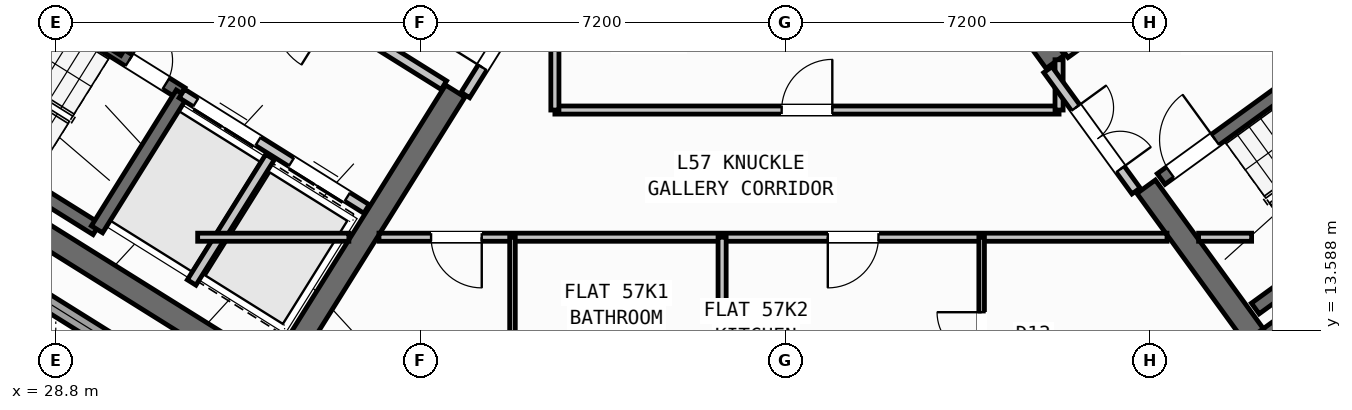
"""IFC4 building model, lengths in metres.
Left out: names, types, materials, properties, quantities, classifications, styles, units other than length and angle.
Written with IfcOpenShell. Run it as: python <this file> out.ifc"""

import sys

from ifc_helpers import new_model, si_unit, direction, frame, frame_2d, origin, place, context, subcontext, project, spatial, rectangle, extrude, source, transform, mapped, element, fill, save


model = new_model("IFC4")
c1 = context("Model", 3, precision=1e-05, world=origin(), true_north=direction((0.0, 1.0)))
c2 = subcontext(c1, "Body", "Model", "MODEL_VIEW")
j1 = project(units=[si_unit("LENGTHUNIT", "METRE"), si_unit("PLANEANGLEUNIT", "RADIAN")], contexts=[c1])
p1 = place(None, origin())
s1 = spatial("IfcSite", under=j1, at=p1, CompositionType="ELEMENT")
p2 = place(p1, origin())
s2 = spatial("IfcBuilding", under=s1, at=p2, CompositionType="ELEMENT")
p3 = place(p2, frame((0.0, 0.0, 225.6)))
s3 = spatial("IfcBuildingStorey", under=s2, at=p3, CompositionType="ELEMENT", Elevation=225.6)
p4 = place(p3, frame((33.324, 12.503, 0.0), z_axis=(0.0, 0.0, 1.0), x_axis=(-0.848043529849, 0.529926571782, 0.0)))
e1 = element("IfcWall", 1, at=p4, inside=s3, PredefinedType="SHEAR", context=c2, shape_type="SweptSolid", body=[
    extrude(rectangle(XDim=13.04, YDim=0.45, at=frame_2d((6.52, 0.0))), origin(), (0.0, 0.0, 1.0), 3.35),
])
p5 = place(p3, frame((36.683, 18.304, 0.0), z_axis=(0.0, 0.0, 1.0), x_axis=(-0.529904039071, -0.848057609704, 0.0)))
e2 = element("IfcWall", 2, at=p5, inside=s3, PredefinedType="SHEAR", context=c2, shape_type="SweptSolid", body=[
    extrude(rectangle(XDim=6.475, YDim=0.45, at=frame_2d((3.238, 0.0))), origin(), (0.0, 0.0, 1.0), 3.35),
])
p6 = place(p3, frame((52.399, 13.169, 0.0), z_axis=(0.0, 0.0, 1.0), x_axis=(0.809022352778, 0.587777877013, 0.0)))
e3 = element("IfcWall", 3, at=p6, inside=s3, PredefinedType="SHEAR", context=c2, shape_type="SweptSolid", body=[
    extrude(rectangle(XDim=12.24, YDim=0.45, at=frame_2d((6.12, 0.0))), origin(), (0.0, 0.0, 1.0), 3.35),
])
p7 = place(p3, frame((52.449, 13.483, 0.0), z_axis=(0.0, 0.0, 1.0), x_axis=(-0.587819244441, 0.808992296542, 0.0)))
e4 = element("IfcWall", 4, at=p7, inside=s3, PredefinedType="SHEAR", context=c2, shape_type="SweptSolid", body=[
    extrude(rectangle(XDim=3.625, YDim=0.45, at=frame_2d((1.812, 0.0))), origin(), (0.0, 0.0, 1.0), 3.35),
])
p8 = place(p3, frame((48.526, 18.884, 0.0), z_axis=(0.0, 0.0, 1.0), x_axis=(-0.587774812919, 0.809024578921, 0.0)))
e5 = element("IfcWall", 5, at=p8, inside=s3, PredefinedType="SHEAR", context=c2, shape_type="SweptSolid", body=[
    extrude(rectangle(XDim=6.475, YDim=0.45, at=frame_2d((3.238, 0.0))), origin(), (0.0, 0.0, 1.0), 3.35),
])
p9 = place(p3, frame((31.76, 12.183, 0.0), z_axis=(0.0, 0.0, 1.0), x_axis=(-0.848047074256, 0.529920899612, 0.0)))
e6 = element("IfcWall", 6, at=p9, inside=s3, PredefinedType="STANDARD", context=c2, shape_type="SweptSolid", body=[
    extrude(rectangle(XDim=30.652, YDim=0.32, at=frame_2d((15.326, 0.0))), origin(), (0.0, 0.0, 1.0), 3.35),
])
p10 = place(p9, frame((15.166, 0.0, 0.0)))
e7 = element("IfcOpeningElement", 7, at=p10, cuts=e6, PredefinedType="OPENING", context=c2, shape_type="SweptSolid", body=[
    extrude(rectangle(XDim=1.2, YDim=2.15, at=frame_2d((0.6, 1.075))), frame((0.0, 0.17, 0.0), z_axis=(0.0, -1.0, 0.0), x_axis=(1.0, 0.0, 0.0)), (0.0, 0.0, 1.0), 0.34),
])
p11 = place(p9, frame((2.24, 0.0, 0.9)))
e8 = element("IfcOpeningElement", 8, at=p11, cuts=e6, PredefinedType="OPENING", context=c2, shape_type="SweptSolid", body=[
    extrude(rectangle(XDim=1.65, YDim=1.45, at=frame_2d((0.825, 0.725))), frame((0.0, 0.17, 0.0), z_axis=(0.0, -1.0, 0.0), x_axis=(1.0, 0.0, 0.0)), (0.0, 0.0, 1.0), 0.34),
])
p12 = place(p9, frame((7.469, 0.0, 0.9)))
e9 = element("IfcOpeningElement", 9, at=p12, cuts=e6, PredefinedType="OPENING", context=c2, shape_type="SweptSolid", body=[
    extrude(rectangle(XDim=1.65, YDim=1.45, at=frame_2d((0.825, 0.725))), frame((0.0, 0.17, 0.0), z_axis=(0.0, -1.0, 0.0), x_axis=(1.0, 0.0, 0.0)), (0.0, 0.0, 1.0), 0.34),
])
p13 = place(p9, frame((12.623, 0.0, 1.0)))
e10 = element("IfcOpeningElement", 10, at=p13, cuts=e6, PredefinedType="OPENING", context=c2, shape_type="SweptSolid", body=[
    extrude(rectangle(XDim=0.9, YDim=1.25, at=frame_2d((0.45, 0.625))), frame((0.0, 0.17, 0.0), z_axis=(0.0, -1.0, 0.0), x_axis=(1.0, 0.0, 0.0)), (0.0, 0.0, 1.0), 0.34),
])
p14 = place(p9, frame((19.556, 0.0, 1.0)))
e11 = element("IfcOpeningElement", 11, at=p14, cuts=e6, PredefinedType="OPENING", context=c2, shape_type="SweptSolid", body=[
    extrude(rectangle(XDim=0.9, YDim=1.25, at=frame_2d((0.45, 0.625))), frame((0.0, 0.17, 0.0), z_axis=(0.0, -1.0, 0.0), x_axis=(1.0, 0.0, 0.0)), (0.0, 0.0, 1.0), 0.34),
])
p15 = place(p9, frame((21.95, 0.0, 1.0)))
e12 = element("IfcOpeningElement", 12, at=p15, cuts=e6, PredefinedType="OPENING", context=c2, shape_type="SweptSolid", body=[
    extrude(rectangle(XDim=0.9, YDim=1.25, at=frame_2d((0.45, 0.625))), frame((0.0, 0.17, 0.0), z_axis=(0.0, -1.0, 0.0), x_axis=(1.0, 0.0, 0.0)), (0.0, 0.0, 1.0), 0.34),
])
p16 = place(p9, frame((26.983, 0.0, 0.9)))
e13 = element("IfcOpeningElement", 13, at=p16, cuts=e6, PredefinedType="OPENING", context=c2, shape_type="SweptSolid", body=[
    extrude(rectangle(XDim=1.35, YDim=1.45, at=frame_2d((0.675, 0.725))), frame((0.0, 0.17, 0.0), z_axis=(0.0, -1.0, 0.0), x_axis=(1.0, 0.0, 0.0)), (0.0, 0.0, 1.0), 0.34),
])
p17 = place(p3, frame((29.605, 15.581, 0.0), z_axis=(0.0, 0.0, 1.0), x_axis=(-0.848036911448, 0.529937163087, 0.0)))
e14 = element("IfcWall", 14, at=p17, inside=s3, PredefinedType="SHEAR", context=c2, shape_type="SweptSolid", body=[
    extrude(rectangle(XDim=7.46, YDim=0.26, at=frame_2d((3.73, 0.0))), origin(), (0.0, 0.0, 1.0), 3.35),
])
p18 = place(p3, frame((31.28, 18.261, 0.0), z_axis=(0.0, 0.0, 1.0), x_axis=(-0.848051618787, 0.529913626805, 0.0)))
e15 = element("IfcWall", 15, at=p18, inside=s3, PredefinedType="SHEAR", context=c2, shape_type="SweptSolid", body=[
    extrude(rectangle(XDim=7.46, YDim=0.26, at=frame_2d((3.73, 0.0))), origin(), (0.0, 0.0, 1.0), 3.35),
])
p19 = place(p18, frame((0.36, 0.0, 0.0)))
e16 = element("IfcOpeningElement", 16, at=p19, cuts=e15, PredefinedType="OPENING", context=c2, shape_type="SweptSolid", body=[
    extrude(rectangle(XDim=0.86, YDim=2.05, at=frame_2d((0.43, 1.025))), frame((0.0, 0.14, 0.0), z_axis=(0.0, -1.0, 0.0), x_axis=(1.0, 0.0, 0.0)), (0.0, 0.0, 1.0), 0.28),
])
p20 = place(p3, frame((31.288, 18.256, 0.0), z_axis=(0.0, 0.0, 1.0), x_axis=(-0.529943379326, -0.848033026897, 0.0)))
e17 = element("IfcWall", 17, at=p20, inside=s3, PredefinedType="SHEAR", context=c2, shape_type="SweptSolid", body=[
    extrude(rectangle(XDim=3.16, YDim=0.26, at=frame_2d((1.58, 0.0))), origin(), (0.0, 0.0, 1.0), 3.35),
])
p21 = place(p3, frame((34.933, 15.978, 0.0), z_axis=(0.0, 0.0, 1.0), x_axis=(-0.848055739377, 0.529907032327, 0.0)))
e18 = element("IfcWall", 18, at=p21, inside=s3, PredefinedType="STANDARD", context=c2, shape_type="SweptSolid", body=[
    extrude(rectangle(XDim=4.298, YDim=0.2, at=frame_2d((2.149, 0.0))), origin(), (0.0, 0.0, 1.0), 3.34),
])
p22 = place(p21, frame((0.448, 0.0, 0.0)))
e19 = element("IfcOpeningElement", 19, at=p22, cuts=e18, PredefinedType="OPENING", context=c2, shape_type="SweptSolid", body=[
    extrude(rectangle(XDim=1.3, YDim=2.2, at=frame_2d((0.65, 1.1))), frame((0.0, 0.11, 0.0), z_axis=(0.0, -1.0, 0.0), x_axis=(1.0, 0.0, 0.0)), (0.0, 0.0, 1.0), 0.22),
])
p23 = place(p21, frame((2.523, 0.0, 0.0)))
e20 = element("IfcOpeningElement", 20, at=p23, cuts=e18, PredefinedType="OPENING", context=c2, shape_type="SweptSolid", body=[
    extrude(rectangle(XDim=1.45, YDim=2.25, at=frame_2d((0.725, 1.125))), frame((0.0, 0.11, 0.0), z_axis=(0.0, -1.0, 0.0), x_axis=(1.0, 0.0, 0.0)), (0.0, 0.0, 1.0), 0.22),
])
p24 = place(p3, frame((36.459, 18.421, 0.0), z_axis=(0.0, 0.0, 1.0), x_axis=(-0.848059591691, 0.529900867089, 0.0)))
e21 = element("IfcWall", 21, at=p24, inside=s3, PredefinedType="STANDARD", context=c2, shape_type="SweptSolid", body=[
    extrude(rectangle(XDim=5.818, YDim=0.2, at=frame_2d((2.909, 0.0))), origin(), (0.0, 0.0, 1.0), 3.34),
])
p25 = place(p24, frame((2.598, 0.0, 0.0)))
e22 = element("IfcOpeningElement", 22, at=p25, cuts=e21, PredefinedType="OPENING", context=c2, shape_type="SweptSolid", body=[
    extrude(rectangle(XDim=1.15, YDim=2.1, at=frame_2d((0.575, 1.05))), frame((0.0, 0.11, 0.0), z_axis=(0.0, -1.0, 0.0), x_axis=(1.0, 0.0, 0.0)), (0.0, 0.0, 1.0), 0.22),
])
p26 = place(p3, frame((33.029, 17.003, 0.0), z_axis=(0.0, 0.0, 1.0), x_axis=(-0.529916267533, -0.848049968695, 0.0)))
e23 = element("IfcWall", 23, at=p26, inside=s3, PredefinedType="STANDARD", context=c2, shape_type="SweptSolid", body=[
    extrude(rectangle(XDim=2.92, YDim=0.2, at=frame_2d((1.46, 0.0))), origin(), (0.0, 0.0, 1.0), 3.34),
])
p27 = place(p3, frame((31.525, 21.504, 0.0), z_axis=(0.0, 0.0, 1.0), x_axis=(-0.529907497854, -0.848055448493, 0.0)))
e24 = element("IfcWall", 24, at=p27, inside=s3, PredefinedType="STANDARD", context=c2, shape_type="SweptSolid", body=[
    extrude(rectangle(XDim=2.88, YDim=0.2, at=frame_2d((1.44, 0.0))), origin(), (0.0, 0.0, 1.0), 3.34),
])
p28 = place(p3, frame((52.472, 14.013, 0.0), z_axis=(0.0, 0.0, 1.0), x_axis=(0.809028366311, 0.587769599847, 0.0)))
e25 = element("IfcWall", 25, at=p28, inside=s3, PredefinedType="SHEAR", context=c2, shape_type="SweptSolid", body=[
    extrude(rectangle(XDim=7.33, YDim=0.26, at=frame_2d((3.665, 0.0))), origin(), (0.0, 0.0, 1.0), 3.35),
])
p29 = place(p3, frame((50.615, 16.57, 0.0), z_axis=(0.0, 0.0, 1.0), x_axis=(0.809028366311, 0.587769599847, 0.0)))
e26 = element("IfcWall", 26, at=p29, inside=s3, PredefinedType="SHEAR", context=c2, shape_type="SweptSolid", body=[
    extrude(rectangle(XDim=7.33, YDim=0.26, at=frame_2d((3.665, 0.0))), origin(), (0.0, 0.0, 1.0), 3.35),
])
p30 = place(p29, frame((0.22, 0.0, 0.0)))
e27 = element("IfcOpeningElement", 27, at=p30, cuts=e26, PredefinedType="OPENING", context=c2, shape_type="SweptSolid", body=[
    extrude(rectangle(XDim=1.1, YDim=2.1, at=frame_2d((0.55, 1.05))), frame((0.0, 0.14, 0.0), z_axis=(0.0, -1.0, 0.0), x_axis=(1.0, 0.0, 0.0)), (0.0, 0.0, 1.0), 0.28),
])
p31 = place(p3, frame((48.718, 19.048, 0.0), z_axis=(0.0, 0.0, 1.0), x_axis=(0.809017261719, 0.587784884325, 0.0)))
e28 = element("IfcWall", 28, at=p31, inside=s3, PredefinedType="STANDARD", context=c2, shape_type="SweptSolid", body=[
    extrude(rectangle(XDim=5.818, YDim=0.2, at=frame_2d((2.909, 0.0))), origin(), (0.0, 0.0, 1.0), 3.34),
])
p32 = place(p31, frame((2.598, 0.0, 0.0)))
e29 = element("IfcOpeningElement", 29, at=p32, cuts=e28, PredefinedType="OPENING", context=c2, shape_type="SweptSolid", body=[
    extrude(rectangle(XDim=1.15, YDim=2.1, at=frame_2d((0.575, 1.05))), frame((0.0, 0.11, 0.0), z_axis=(0.0, -1.0, 0.0), x_axis=(1.0, 0.0, 0.0)), (0.0, 0.0, 1.0), 0.22),
])
p33 = place(p3, frame((38.451, 20.737, 0.0), z_axis=(0.0, 0.0, 1.0), x_axis=(-0.529924799939, -0.848044637038, 0.0)))
e30 = element("IfcWall", 30, at=p33, inside=s3, PredefinedType="STANDARD", context=c2, shape_type="SweptSolid", body=[
    extrude(rectangle(XDim=2.96, YDim=0.2, at=frame_2d((1.48, 0.0))), origin(), (0.0, 0.0, 1.0), 3.34),
])
p34 = place(p33, frame((1.46, 0.0, 0.0)))
e31 = element("IfcOpeningElement", 31, at=p34, cuts=e30, PredefinedType="OPENING", context=c2, shape_type="SweptSolid", body=[
    extrude(rectangle(XDim=0.86, YDim=2.05, at=frame_2d((0.43, 1.025))), frame((0.0, 0.11, 0.0), z_axis=(0.0, -1.0, 0.0), x_axis=(1.0, 0.0, 0.0)), (0.0, 0.0, 1.0), 0.22),
])
p35 = place(p3, frame((31.6, 15.42, 0.0), z_axis=(0.0, 0.0, 1.0), x_axis=(1.0, 0.0, 0.0)))
e32 = element("IfcWall", 32, at=p35, inside=s3, PredefinedType="PARTITIONING", context=c2, shape_type="SweptSolid", body=[
    extrude(rectangle(XDim=2.984, YDim=0.16, at=frame_2d((1.492, 0.0))), origin(), (0.0, 0.0, 1.0), 3.34),
])
p36 = place(p3, frame((35.178, 15.42, 0.0), z_axis=(0.0, 0.0, 1.0), x_axis=(1.0, 0.0, 0.0)))
e33 = element("IfcWall", 33, at=p36, inside=s3, PredefinedType="PARTITIONING", context=c2, shape_type="SweptSolid", body=[
    extrude(rectangle(XDim=15.552, YDim=0.16, at=frame_2d((7.776, 0.0))), origin(), (0.0, 0.0, 1.0), 3.34),
])
p37 = place(p36, frame((1.028, 0.0, 0.0)))
e34 = element("IfcOpeningElement", 34, at=p37, cuts=e33, PredefinedType="OPENING", context=c2, shape_type="SweptSolid", body=[
    extrude(rectangle(XDim=1.0, YDim=2.1, at=frame_2d((0.5, 1.05))), frame((0.0, 0.09, 0.0), z_axis=(0.0, -1.0, 0.0), x_axis=(1.0, 0.0, 0.0)), (0.0, 0.0, 1.0), 0.18),
])
p38 = place(p36, frame((8.858, 0.0, 0.0)))
e35 = element("IfcOpeningElement", 35, at=p38, cuts=e33, PredefinedType="OPENING", context=c2, shape_type="SweptSolid", body=[
    extrude(rectangle(XDim=1.0, YDim=2.1, at=frame_2d((0.5, 1.05))), frame((0.0, 0.09, 0.0), z_axis=(0.0, -1.0, 0.0), x_axis=(1.0, 0.0, 0.0)), (0.0, 0.0, 1.0), 0.18),
])
p39 = place(p3, frame((51.354, 15.42, 0.0), z_axis=(0.0, 0.0, 1.0), x_axis=(1.0, 0.0, 0.0)))
e36 = element("IfcWall", 36, at=p39, inside=s3, PredefinedType="PARTITIONING", context=c2, shape_type="SweptSolid", body=[
    extrude(rectangle(XDim=1.046, YDim=0.16, at=frame_2d((0.523, 0.0))), origin(), (0.0, 0.0, 1.0), 3.34),
])
p40 = place(p3, frame((38.65, 17.93, 0.0), z_axis=(0.0, 0.0, 1.0), x_axis=(1.0, 0.0, 0.0)))
e37 = element("IfcWall", 37, at=p40, inside=s3, PredefinedType="PARTITIONING", context=c2, shape_type="SweptSolid", body=[
    extrude(rectangle(XDim=9.95, YDim=0.16, at=frame_2d((4.975, 0.0))), origin(), (0.0, 0.0, 1.0), 3.34),
])
p41 = place(p40, frame((4.475, 0.0, 0.0)))
e38 = element("IfcOpeningElement", 38, at=p41, cuts=e37, PredefinedType="OPENING", context=c2, shape_type="SweptSolid", body=[
    extrude(rectangle(XDim=1.0, YDim=2.1, at=frame_2d((0.5, 1.05))), frame((0.0, 0.09, 0.0), z_axis=(0.0, -1.0, 0.0), x_axis=(1.0, 0.0, 0.0)), (0.0, 0.0, 1.0), 0.18),
])
p42 = place(p3, frame((38.65, 17.93, 0.0), z_axis=(0.0, 0.0, 1.0), x_axis=(0.0, 1.0, 0.0)))
e39 = element("IfcWall", 39, at=p42, inside=s3, PredefinedType="PARTITIONING", context=c2, shape_type="SweptSolid", body=[
    extrude(rectangle(XDim=3.046, YDim=0.16, at=frame_2d((1.523, 0.0))), origin(), (0.0, 0.0, 1.0), 3.34),
])
p43 = place(p3, frame((48.6, 17.93, 0.0), z_axis=(0.0, 0.0, 1.0), x_axis=(0.0, 1.0, 0.0)))
e40 = element("IfcWall", 40, at=p43, inside=s3, PredefinedType="PARTITIONING", context=c2, shape_type="SweptSolid", body=[
    extrude(rectangle(XDim=0.993, YDim=0.16, at=frame_2d((0.496, 0.0))), origin(), (0.0, 0.0, 1.0), 3.34),
])
p44 = place(p3, frame((50.119, 16.333, 0.0), z_axis=(0.0, 0.0, 1.0), x_axis=(-0.587749856981, 0.809042709391, 0.0)))
e41 = element("IfcWall", 41, at=p44, inside=s3, PredefinedType="STANDARD", context=c2, shape_type="SweptSolid", body=[
    extrude(rectangle(XDim=2.96, YDim=0.2, at=frame_2d((1.48, 0.0))), origin(), (0.0, 0.0, 1.0), 3.34),
])
p45 = place(p44, frame((0.53, 0.0, 0.0)))
e42 = element("IfcOpeningElement", 42, at=p45, cuts=e41, PredefinedType="OPENING", context=c2, shape_type="SweptSolid", body=[
    extrude(rectangle(XDim=1.5, YDim=2.15, at=frame_2d((0.75, 1.075))), frame((0.0, 0.11, 0.0), z_axis=(0.0, -1.0, 0.0), x_axis=(1.0, 0.0, 0.0)), (0.0, 0.0, 1.0), 0.22),
])
p46 = place(p3, frame((41.95, 1.96, 0.0), z_axis=(0.0, 0.0, 1.0), x_axis=(0.0, 1.0, 0.0)))
e43 = element("IfcWall", 43, at=p46, inside=s3, PredefinedType="PARTITIONING", context=c2, shape_type="SweptSolid", body=[
    extrude(rectangle(XDim=13.46, YDim=0.16, at=frame_2d((6.73, 0.0))), origin(), (0.0, 0.0, 1.0), 3.34),
])
p47 = place(p3, frame((37.813, 1.96, 0.0), z_axis=(0.0, 0.0, 1.0), x_axis=(0.0, 1.0, 0.0)))
e44 = element("IfcWall", 44, at=p47, inside=s3, PredefinedType="PARTITIONING", context=c2, shape_type="SweptSolid", body=[
    extrude(rectangle(XDim=13.46, YDim=0.11, at=frame_2d((6.73, 0.0))), origin(), (0.0, 0.0, 1.0), 3.34),
])
p48 = place(p47, frame((5.5, 0.0, 0.0)))
e45 = element("IfcOpeningElement", 45, at=p48, cuts=e44, PredefinedType="OPENING", context=c2, shape_type="SweptSolid", body=[
    extrude(rectangle(XDim=0.92, YDim=2.08, at=frame_2d((0.46, 1.04))), frame((0.0, 0.065, 0.0), z_axis=(0.0, -1.0, 0.0), x_axis=(1.0, 0.0, 0.0)), (0.0, 0.0, 1.0), 0.13),
])
p49 = place(p47, frame((10.45, 0.0, 0.0)))
e46 = element("IfcOpeningElement", 46, at=p49, cuts=e44, PredefinedType="OPENING", context=c2, shape_type="SweptSolid", body=[
    extrude(rectangle(XDim=0.88, YDim=2.08, at=frame_2d((0.44, 1.04))), frame((0.0, 0.065, 0.0), z_axis=(0.0, -1.0, 0.0), x_axis=(1.0, 0.0, 0.0)), (0.0, 0.0, 1.0), 0.13),
])
p50 = place(p3, frame((47.072, 1.96, 0.0), z_axis=(0.0, 0.0, 1.0), x_axis=(0.0, 1.0, 0.0)))
e47 = element("IfcWall", 47, at=p50, inside=s3, PredefinedType="PARTITIONING", context=c2, shape_type="SweptSolid", body=[
    extrude(rectangle(XDim=13.46, YDim=0.11, at=frame_2d((6.73, 0.0))), origin(), (0.0, 0.0, 1.0), 3.34),
])
p51 = place(p50, frame((6.6, 0.0, 0.0)))
e48 = element("IfcOpeningElement", 48, at=p51, cuts=e47, PredefinedType="OPENING", context=c2, shape_type="SweptSolid", body=[
    extrude(rectangle(XDim=0.92, YDim=2.08, at=frame_2d((0.46, 1.04))), frame((0.0, 0.065, 0.0), z_axis=(0.0, -1.0, 0.0), x_axis=(1.0, 0.0, 0.0)), (0.0, 0.0, 1.0), 0.13),
])
p52 = place(p50, frame((11.1, 0.0, 0.0)))
e49 = element("IfcOpeningElement", 49, at=p52, cuts=e47, PredefinedType="OPENING", context=c2, shape_type="SweptSolid", body=[
    extrude(rectangle(XDim=0.88, YDim=2.08, at=frame_2d((0.44, 1.04))), frame((0.0, 0.065, 0.0), z_axis=(0.0, -1.0, 0.0), x_axis=(1.0, 0.0, 0.0)), (0.0, 0.0, 1.0), 0.13),
])
m1 = source(origin(), c2, "Body", "SweptSolid", [
    extrude(rectangle(XDim=1.65, YDim=1.45, at=frame_2d((0.825, 0.725))), frame((0.0, 0.03, 0.0), z_axis=(0.0, -1.0, 0.0), x_axis=(1.0, 0.0, 0.0)), (0.0, 0.0, 1.0), 0.06),
])
p53 = place(p11, origin())
e50 = element("IfcWindow", 50, at=p53, inside=s3, PartitioningType="SINGLE_PANEL", PredefinedType="WINDOW", context=c2, shape_type="MappedRepresentation", body=[
    mapped(m1, transform((0.0, 0.0, 0.0), scale=1.0)),
])
fill(e8, e50)
m2 = source(origin(), c2, "Body", "SweptSolid", [
    extrude(rectangle(XDim=0.86, YDim=2.05, at=frame_2d((0.43, 1.025))), frame((0.0, 0.025, 0.0), z_axis=(0.0, -1.0, 0.0), x_axis=(1.0, 0.0, 0.0)), (0.0, 0.0, 1.0), 0.05),
])
p54 = place(p19, frame((0.86, 0.0, 0.0), z_axis=(0.0, 0.0, 1.0), x_axis=(-1.0, 0.0, 0.0)))
e51 = element("IfcDoor", 51, at=p54, inside=s3, OperationType="SINGLE_SWING_LEFT", PredefinedType="DOOR", context=c2, shape_type="MappedRepresentation", body=[
    mapped(m2, transform((0.0, 0.0, 0.0), scale=1.0)),
])
fill(e16, e51)
m3 = source(origin(), c2, "Body", "SweptSolid", [
    extrude(rectangle(XDim=1.3, YDim=2.2, at=frame_2d((0.65, 1.1))), frame((0.0, 0.025, 0.0), z_axis=(0.0, -1.0, 0.0), x_axis=(1.0, 0.0, 0.0)), (0.0, 0.0, 1.0), 0.05),
])
p55 = place(p22, origin())
e52 = element("IfcDoor", 52, at=p55, inside=s3, OperationType="DOUBLE_DOOR_SLIDING", PredefinedType="DOOR", context=c2, shape_type="MappedRepresentation", body=[
    mapped(m3, transform((0.0, 0.0, 0.0), scale=1.0)),
])
fill(e19, e52)
m4 = source(origin(), c2, "Body", "SweptSolid", [
    extrude(rectangle(XDim=1.45, YDim=2.25, at=frame_2d((0.725, 1.125))), frame((0.0, 0.025, 0.0), z_axis=(0.0, -1.0, 0.0), x_axis=(1.0, 0.0, 0.0)), (0.0, 0.0, 1.0), 0.05),
])
p56 = place(p23, origin())
e53 = element("IfcDoor", 53, at=p56, inside=s3, OperationType="DOUBLE_DOOR_SLIDING", PredefinedType="DOOR", context=c2, shape_type="MappedRepresentation", body=[
    mapped(m4, transform((0.0, 0.0, 0.0), scale=1.0)),
])
fill(e20, e53)
m5 = source(origin(), c2, "Body", "SweptSolid", [
    extrude(rectangle(XDim=1.1, YDim=2.1, at=frame_2d((0.55, 1.05))), frame((0.0, 0.025, 0.0), z_axis=(0.0, -1.0, 0.0), x_axis=(1.0, 0.0, 0.0)), (0.0, 0.0, 1.0), 0.05),
])
p57 = place(p30, origin())
e54 = element("IfcDoor", 54, at=p57, inside=s3, OperationType="SINGLE_SWING_RIGHT", PredefinedType="DOOR", context=c2, shape_type="MappedRepresentation", body=[
    mapped(m5, transform((0.0, 0.0, 0.0), scale=1.0)),
])
fill(e27, e54)
m6 = source(origin(), c2, "Body", "SweptSolid", [
    extrude(rectangle(XDim=1.0, YDim=2.1, at=frame_2d((0.5, 1.05))), frame((0.0, 0.025, 0.0), z_axis=(0.0, -1.0, 0.0), x_axis=(1.0, 0.0, 0.0)), (0.0, 0.0, 1.0), 0.05),
])
p58 = place(p41, origin())
e55 = element("IfcDoor", 55, at=p58, inside=s3, OperationType="SINGLE_SWING_RIGHT", PredefinedType="DOOR", context=c2, shape_type="MappedRepresentation", body=[
    mapped(m6, transform((0.0, 0.0, 0.0), scale=1.0)),
])
fill(e38, e55)
p59 = place(p34, frame((0.86, 0.0, 0.0), z_axis=(0.0, 0.0, 1.0), x_axis=(-1.0, 0.0, 0.0)))
e56 = element("IfcDoor", 56, at=p59, inside=s3, OperationType="SINGLE_SWING_LEFT", PredefinedType="DOOR", context=c2, shape_type="MappedRepresentation", body=[
    mapped(m2, transform((0.0, 0.0, 0.0), scale=1.0)),
])
fill(e31, e56)
m7 = source(origin(), c2, "Body", "SweptSolid", [
    extrude(rectangle(XDim=1.5, YDim=2.15, at=frame_2d((0.75, 1.075))), frame((0.0, 0.025, 0.0), z_axis=(0.0, -1.0, 0.0), x_axis=(1.0, 0.0, 0.0)), (0.0, 0.0, 1.0), 0.05),
])
p60 = place(p45, frame((1.5, 0.0, 0.0), z_axis=(0.0, 0.0, 1.0), x_axis=(-1.0, 0.0, 0.0)))
e57 = element("IfcDoor", 57, at=p60, inside=s3, OperationType="DOUBLE_DOOR_SINGLE_SWING", PredefinedType="DOOR", context=c2, shape_type="MappedRepresentation", body=[
    mapped(m7, transform((0.0, 0.0, 0.0), scale=1.0)),
])
fill(e42, e57)
p61 = place(p37, frame((1.0, 0.0, 0.0), z_axis=(0.0, 0.0, 1.0), x_axis=(-1.0, 0.0, 0.0)))
e58 = element("IfcDoor", 58, at=p61, inside=s3, OperationType="SINGLE_SWING_LEFT", PredefinedType="DOOR", context=c2, shape_type="MappedRepresentation", body=[
    mapped(m6, transform((0.0, 0.0, 0.0), scale=1.0)),
])
fill(e34, e58)
p62 = place(p38, frame((1.0, 0.0, 0.0), z_axis=(0.0, 0.0, 1.0), x_axis=(-1.0, 0.0, 0.0)))
e59 = element("IfcDoor", 59, at=p62, inside=s3, OperationType="SINGLE_SWING_RIGHT", PredefinedType="DOOR", context=c2, shape_type="MappedRepresentation", body=[
    mapped(m6, transform((0.0, 0.0, 0.0), scale=1.0)),
])
fill(e35, e59)
m8 = source(origin(), c2, "Body", "SweptSolid", [
    extrude(rectangle(XDim=0.88, YDim=2.08, at=frame_2d((0.44, 1.04))), frame((0.0, 0.025, 0.0), z_axis=(0.0, -1.0, 0.0), x_axis=(1.0, 0.0, 0.0)), (0.0, 0.0, 1.0), 0.05),
])
p63 = place(p52, origin())
e60 = element("IfcDoor", 60, at=p63, inside=s3, OperationType="SINGLE_SWING_RIGHT", PredefinedType="DOOR", context=c2, shape_type="MappedRepresentation", body=[
    mapped(m8, transform((0.0, 0.0, 0.0), scale=1.0)),
])
fill(e49, e60)
save(model, sys.argv[1])
